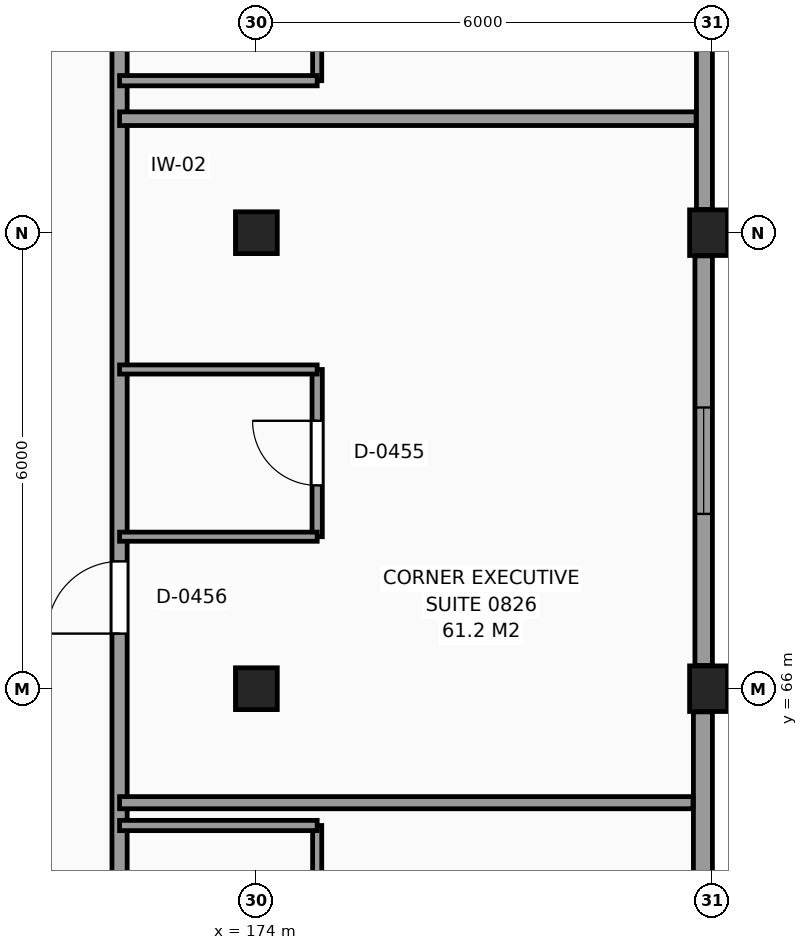
"""IFC4 building model, lengths in metres.
Left out: names, types, materials, properties, quantities, classifications, styles, units other than length and angle.
Written with IfcOpenShell. Run it as: python <this file> out.ifc"""

import sys

from ifc_helpers import new_model, si_unit, direction, frame, frame_2d, origin, origin_2d, place, context, subcontext, project, spatial, rectangle, extrude, element, fill, save


model = new_model("IFC4")
c1 = context("Model", 3, precision=1e-05, world=origin(), true_north=direction((0.0, 1.0)))
c2 = subcontext(c1, "Body", "Model", "MODEL_VIEW")
j1 = project(units=[si_unit("LENGTHUNIT", "METRE"), si_unit("PLANEANGLEUNIT", "RADIAN")], contexts=[c1])
p1 = place(None, origin())
s1 = spatial("IfcSite", under=j1, at=p1, CompositionType="ELEMENT")
p2 = place(p1, origin())
s2 = spatial("IfcBuilding", under=s1, at=p2, CompositionType="ELEMENT")
p3 = place(p2, frame((0.0, 0.0, 34.8)))
s3 = spatial("IfcBuildingStorey", under=s2, at=p3, CompositionType="ELEMENT", Elevation=34.8)
for number, where, z_axis, x_axis in (
    (1, (174.0, 66.0, 0.0), (0.0, 0.0, 1.0), (1.0, 0.0, 0.0)),
    (2, (174.0, 72.0, 0.0), (0.0, 0.0, 1.0), (1.0, 0.0, 0.0)),
):
    element("IfcColumn", number, at=place(p3, frame(where, z_axis=z_axis, x_axis=x_axis)), inside=s3, PredefinedType="COLUMN", context=c2, shape_type="SweptSolid", body=[
        extrude(rectangle(XDim=0.55, YDim=0.55, at=origin_2d()), origin(), (0.0, 0.0, 1.0), 3.3),
    ])
for number, where, z_axis, x_axis in (
    (3, (180.0, 66.0, 0.0), (0.0, 0.0, 1.0), (1.0, 0.0, 0.0)),
    (4, (180.0, 72.0, 0.0), (0.0, 0.0, 1.0), (1.0, 0.0, 0.0)),
):
    element("IfcColumn", number, at=place(p3, frame(where, z_axis=z_axis, x_axis=x_axis)), inside=s3, PredefinedType="COLUMN", context=c2, shape_type="SweptSolid", body=[
        extrude(rectangle(XDim=0.6, YDim=0.6, at=origin_2d()), origin(), (0.0, 0.0, 1.0), 3.3),
    ])
p4 = place(p3, frame((179.875, 60.305, 0.0), z_axis=(0.0, 0.0, 1.0), x_axis=(0.0, 1.0, 0.0)))
e5 = element("IfcWall", 5, at=p4, inside=s3, PredefinedType="SOLIDWALL", context=c2, shape_type="SweptSolid", body=[
    extrude(rectangle(XDim=5.39, YDim=0.25, at=frame_2d((2.695, 0.0))), origin(), (0.0, 0.0, 1.0), 2.42),
])
p5 = place(p4, frame((1.407, 0.0, 0.8)))
e6 = element("IfcOpeningElement", 6, at=p5, cuts=e5, PredefinedType="OPENING", context=c2, shape_type="SweptSolid", body=[
    extrude(rectangle(XDim=1.4, YDim=1.4, at=frame_2d((0.7, 0.7))), frame((0.0, 0.135, 0.0), z_axis=(0.0, -1.0, 0.0), x_axis=(1.0, 0.0, 0.0)), (0.0, 0.0, 1.0), 0.27),
])
p6 = place(p3, frame((179.885, 66.305, 0.0), z_axis=(0.0, 0.0, 1.0), x_axis=(0.0, 1.0, 0.0)))
e7 = element("IfcWall", 7, at=p6, inside=s3, PredefinedType="SOLIDWALL", context=c2, shape_type="SweptSolid", body=[
    extrude(rectangle(XDim=5.39, YDim=0.23, at=frame_2d((2.695, 0.0))), origin(), (0.0, 0.0, 1.0), 2.42),
])
p7 = place(p6, frame((1.995, 0.0, 0.8)))
e8 = element("IfcOpeningElement", 8, at=p7, cuts=e7, PredefinedType="OPENING", context=c2, shape_type="SweptSolid", body=[
    extrude(rectangle(XDim=1.4, YDim=1.4, at=frame_2d((0.7, 0.7))), frame((0.0, 0.125, 0.0), z_axis=(0.0, -1.0, 0.0), x_axis=(1.0, 0.0, 0.0)), (0.0, 0.0, 1.0), 0.25),
])
p8 = place(p3, frame((179.895, 72.305, 0.0), z_axis=(0.0, 0.0, 1.0), x_axis=(0.0, 1.0, 0.0)))
e9 = element("IfcWall", 9, at=p8, inside=s3, PredefinedType="SOLIDWALL", context=c2, shape_type="SweptSolid", body=[
    extrude(rectangle(XDim=5.39, YDim=0.21, at=frame_2d((2.695, 0.0))), origin(), (0.0, 0.0, 1.0), 2.42),
])
p9 = place(p8, frame((2.582, 0.0, 0.8)))
e10 = element("IfcOpeningElement", 10, at=p9, cuts=e9, PredefinedType="OPENING", context=c2, shape_type="SweptSolid", body=[
    extrude(rectangle(XDim=1.4, YDim=1.4, at=frame_2d((0.7, 0.7))), frame((0.0, 0.115, 0.0), z_axis=(0.0, -1.0, 0.0), x_axis=(1.0, 0.0, 0.0)), (0.0, 0.0, 1.0), 0.23),
])
p10 = place(p3, frame((172.2, 42.235, 0.0), z_axis=(0.0, 0.0, 1.0), x_axis=(0.0, 1.0, 0.0)))
e11 = element("IfcWall", 11, at=p10, inside=s3, PredefinedType="PARTITIONING", context=c2, shape_type="SweptSolid", body=[
    extrude(rectangle(XDim=65.585, YDim=0.2, at=frame_2d((32.792, 0.0))), origin(), (0.0, 0.0, 1.0), 3.07),
])
p11 = place(p10, frame((7.59, 0.0, 0.0)))
e12 = element("IfcOpeningElement", 12, at=p11, cuts=e11, PredefinedType="OPENING", context=c2, shape_type="SweptSolid", body=[
    extrude(rectangle(XDim=0.95, YDim=2.1, at=frame_2d((0.475, 1.05))), frame((0.0, 0.11, 0.0), z_axis=(0.0, -1.0, 0.0), x_axis=(1.0, 0.0, 0.0)), (0.0, 0.0, 1.0), 0.22),
])
p12 = place(p10, frame((12.09, 0.0, 0.0)))
e13 = element("IfcOpeningElement", 13, at=p12, cuts=e11, PredefinedType="OPENING", context=c2, shape_type="SweptSolid", body=[
    extrude(rectangle(XDim=0.95, YDim=2.1, at=frame_2d((0.475, 1.05))), frame((0.0, 0.11, 0.0), z_axis=(0.0, -1.0, 0.0), x_axis=(1.0, 0.0, 0.0)), (0.0, 0.0, 1.0), 0.22),
])
p13 = place(p10, frame((16.29, 0.0, 0.0)))
e14 = element("IfcOpeningElement", 14, at=p13, cuts=e11, PredefinedType="OPENING", context=c2, shape_type="SweptSolid", body=[
    extrude(rectangle(XDim=0.95, YDim=2.1, at=frame_2d((0.475, 1.05))), frame((0.0, 0.11, 0.0), z_axis=(0.0, -1.0, 0.0), x_axis=(1.0, 0.0, 0.0)), (0.0, 0.0, 1.0), 0.22),
])
p14 = place(p10, frame((18.49, 0.0, 0.0)))
e15 = element("IfcOpeningElement", 15, at=p14, cuts=e11, PredefinedType="OPENING", context=c2, shape_type="SweptSolid", body=[
    extrude(rectangle(XDim=0.95, YDim=2.1, at=frame_2d((0.475, 1.05))), frame((0.0, 0.11, 0.0), z_axis=(0.0, -1.0, 0.0), x_axis=(1.0, 0.0, 0.0)), (0.0, 0.0, 1.0), 0.22),
])
p15 = place(p10, frame((24.49, 0.0, 0.0)))
e16 = element("IfcOpeningElement", 16, at=p15, cuts=e11, PredefinedType="OPENING", context=c2, shape_type="SweptSolid", body=[
    extrude(rectangle(XDim=0.95, YDim=2.1, at=frame_2d((0.475, 1.05))), frame((0.0, 0.11, 0.0), z_axis=(0.0, -1.0, 0.0), x_axis=(1.0, 0.0, 0.0)), (0.0, 0.0, 1.0), 0.22),
])
p16 = place(p10, frame((34.29, 0.0, 0.0)))
e17 = element("IfcOpeningElement", 17, at=p16, cuts=e11, PredefinedType="OPENING", context=c2, shape_type="SweptSolid", body=[
    extrude(rectangle(XDim=0.95, YDim=2.1, at=frame_2d((0.475, 1.05))), frame((0.0, 0.11, 0.0), z_axis=(0.0, -1.0, 0.0), x_axis=(1.0, 0.0, 0.0)), (0.0, 0.0, 1.0), 0.22),
])
p17 = place(p10, frame((36.49, 0.0, 0.0)))
e18 = element("IfcOpeningElement", 18, at=p17, cuts=e11, PredefinedType="OPENING", context=c2, shape_type="SweptSolid", body=[
    extrude(rectangle(XDim=0.95, YDim=2.1, at=frame_2d((0.475, 1.05))), frame((0.0, 0.11, 0.0), z_axis=(0.0, -1.0, 0.0), x_axis=(1.0, 0.0, 0.0)), (0.0, 0.0, 1.0), 0.22),
])
p18 = place(p10, frame((40.89, 0.0, 0.0)))
e19 = element("IfcOpeningElement", 19, at=p18, cuts=e11, PredefinedType="OPENING", context=c2, shape_type="SweptSolid", body=[
    extrude(rectangle(XDim=0.95, YDim=2.1, at=frame_2d((0.475, 1.05))), frame((0.0, 0.11, 0.0), z_axis=(0.0, -1.0, 0.0), x_axis=(1.0, 0.0, 0.0)), (0.0, 0.0, 1.0), 0.22),
])
p19 = place(p10, frame((45.39, 0.0, 0.0)))
e20 = element("IfcOpeningElement", 20, at=p19, cuts=e11, PredefinedType="OPENING", context=c2, shape_type="SweptSolid", body=[
    extrude(rectangle(XDim=0.95, YDim=2.1, at=frame_2d((0.475, 1.05))), frame((0.0, 0.11, 0.0), z_axis=(0.0, -1.0, 0.0), x_axis=(1.0, 0.0, 0.0)), (0.0, 0.0, 1.0), 0.22),
])
p20 = place(p10, frame((54.49, 0.0, 0.0)))
e21 = element("IfcOpeningElement", 21, at=p20, cuts=e11, PredefinedType="OPENING", context=c2, shape_type="SweptSolid", body=[
    extrude(rectangle(XDim=0.95, YDim=2.1, at=frame_2d((0.475, 1.05))), frame((0.0, 0.11, 0.0), z_axis=(0.0, -1.0, 0.0), x_axis=(1.0, 0.0, 0.0)), (0.0, 0.0, 1.0), 0.22),
])
p21 = place(p10, frame((60.49, 0.0, 0.0)))
e22 = element("IfcOpeningElement", 22, at=p21, cuts=e11, PredefinedType="OPENING", context=c2, shape_type="SweptSolid", body=[
    extrude(rectangle(XDim=0.95, YDim=2.1, at=frame_2d((0.475, 1.05))), frame((0.0, 0.11, 0.0), z_axis=(0.0, -1.0, 0.0), x_axis=(1.0, 0.0, 0.0)), (0.0, 0.0, 1.0), 0.22),
])
p22 = place(p3, frame((174.8, 62.0, 0.0), z_axis=(0.0, 0.0, 1.0), x_axis=(0.0, 1.0, 0.0)))
e23 = element("IfcWall", 23, at=p22, inside=s3, PredefinedType="PARTITIONING", context=c2, shape_type="SweptSolid", body=[
    extrude(rectangle(XDim=2.2, YDim=0.12, at=frame_2d((1.1, 0.0))), origin(), (0.0, 0.0, 1.0), 3.07),
])
p23 = place(p22, frame((0.675, 0.0, 0.0)))
e24 = element("IfcOpeningElement", 24, at=p23, cuts=e23, PredefinedType="OPENING", context=c2, shape_type="SweptSolid", body=[
    extrude(rectangle(XDim=0.85, YDim=2.1, at=frame_2d((0.425, 1.05))), frame((0.0, 0.07, 0.0), z_axis=(0.0, -1.0, 0.0), x_axis=(1.0, 0.0, 0.0)), (0.0, 0.0, 1.0), 0.14),
])
p24 = place(p3, frame((174.8, 68.0, 0.0), z_axis=(0.0, 0.0, 1.0), x_axis=(0.0, 1.0, 0.0)))
e25 = element("IfcWall", 25, at=p24, inside=s3, PredefinedType="PARTITIONING", context=c2, shape_type="SweptSolid", body=[
    extrude(rectangle(XDim=2.2, YDim=0.135, at=frame_2d((1.1, 0.0))), origin(), (0.0, 0.0, 1.0), 3.07),
])
p25 = place(p24, frame((0.675, 0.0, 0.0)))
e26 = element("IfcOpeningElement", 26, at=p25, cuts=e25, PredefinedType="OPENING", context=c2, shape_type="SweptSolid", body=[
    extrude(rectangle(XDim=0.85, YDim=2.1, at=frame_2d((0.425, 1.05))), frame((0.0, 0.078, 0.0), z_axis=(0.0, -1.0, 0.0), x_axis=(1.0, 0.0, 0.0)), (0.0, 0.0, 1.0), 0.155),
])
p26 = place(p3, frame((174.8, 74.0, 0.0), z_axis=(0.0, 0.0, 1.0), x_axis=(0.0, 1.0, 0.0)))
e27 = element("IfcWall", 27, at=p26, inside=s3, PredefinedType="PARTITIONING", context=c2, shape_type="SweptSolid", body=[
    extrude(rectangle(XDim=2.2, YDim=0.12, at=frame_2d((1.1, 0.0))), origin(), (0.0, 0.0, 1.0), 3.07),
])
p27 = place(p26, frame((0.675, 0.0, 0.0)))
e28 = element("IfcOpeningElement", 28, at=p27, cuts=e27, PredefinedType="OPENING", context=c2, shape_type="SweptSolid", body=[
    extrude(rectangle(XDim=0.85, YDim=2.1, at=frame_2d((0.425, 1.05))), frame((0.0, 0.07, 0.0), z_axis=(0.0, -1.0, 0.0), x_axis=(1.0, 0.0, 0.0)), (0.0, 0.0, 1.0), 0.14),
])
p28 = place(p3, frame((172.2, 64.2, 0.0), z_axis=(0.0, 0.0, 1.0), x_axis=(1.0, 0.0, 0.0)))
e29 = element("IfcWall", 29, at=p28, inside=s3, PredefinedType="PARTITIONING", context=c2, shape_type="SweptSolid", body=[
    extrude(rectangle(XDim=2.6, YDim=0.135, at=frame_2d((1.3, 0.0))), origin(), (0.0, 0.0, 1.0), 3.07),
])
p29 = place(p3, frame((172.2, 64.5, 0.0), z_axis=(0.0, 0.0, 1.0), x_axis=(1.0, 0.0, 0.0)))
e30 = element("IfcWall", 30, at=p29, inside=s3, PredefinedType="PARTITIONING", context=c2, shape_type="SweptSolid", body=[
    extrude(rectangle(XDim=7.545, YDim=0.16, at=frame_2d((3.772, 0.0))), origin(), (0.0, 0.0, 1.0), 3.07),
])
for number, where, z_axis, x_axis in (
    (31, (172.2, 68.0, 0.0), (0.0, 0.0, 1.0), (1.0, 0.0, 0.0)),
    (32, (172.2, 70.2, 0.0), (0.0, 0.0, 1.0), (1.0, 0.0, 0.0)),
):
    element("IfcWall", number, at=place(p3, frame(where, z_axis=z_axis, x_axis=x_axis)), inside=s3, PredefinedType="PARTITIONING", context=c2, shape_type="SweptSolid", body=[
        extrude(rectangle(XDim=2.6, YDim=0.12, at=frame_2d((1.3, 0.0))), origin(), (0.0, 0.0, 1.0), 3.07),
    ])
p30 = place(p3, frame((172.2, 73.5, 0.0), z_axis=(0.0, 0.0, 1.0), x_axis=(1.0, 0.0, 0.0)))
e33 = element("IfcWall", 33, at=p30, inside=s3, PredefinedType="PARTITIONING", context=c2, shape_type="SweptSolid", body=[
    extrude(rectangle(XDim=7.585, YDim=0.18, at=frame_2d((3.792, 0.0))), origin(), (0.0, 0.0, 1.0), 3.07),
])
p31 = place(p3, frame((172.2, 74.0, 0.0), z_axis=(0.0, 0.0, 1.0), x_axis=(1.0, 0.0, 0.0)))
e34 = element("IfcWall", 34, at=p31, inside=s3, PredefinedType="PARTITIONING", context=c2, shape_type="SweptSolid", body=[
    extrude(rectangle(XDim=2.6, YDim=0.135, at=frame_2d((1.3, 0.0))), origin(), (0.0, 0.0, 1.0), 3.07),
])
p32 = place(p7, origin())
e35 = element("IfcWindow", 35, at=p32, inside=s3, PartitioningType="SINGLE_PANEL", PredefinedType="WINDOW", context=c2, shape_type="SweptSolid", body=[
    extrude(rectangle(XDim=1.4, YDim=1.4, at=frame_2d((0.7, 0.7))), frame((0.0, 0.03, 0.0), z_axis=(0.0, -1.0, 0.0), x_axis=(1.0, 0.0, 0.0)), (0.0, 0.0, 1.0), 0.06),
])
fill(e8, e35)
p33 = place(p25, origin())
e36 = element("IfcDoor", 36, at=p33, inside=s3, OperationType="SINGLE_SWING_RIGHT", PredefinedType="DOOR", context=c2, shape_type="SweptSolid", body=[
    extrude(rectangle(XDim=0.85, YDim=2.1, at=frame_2d((0.425, 1.05))), frame((0.0, 0.025, 0.0), z_axis=(0.0, -1.0, 0.0), x_axis=(1.0, 0.0, 0.0)), (0.0, 0.0, 1.0), 0.05),
])
fill(e26, e36)
p34 = place(p15, origin())
e37 = element("IfcDoor", 37, at=p34, inside=s3, OperationType="SINGLE_SWING_LEFT", PredefinedType="DOOR", context=c2, shape_type="SweptSolid", body=[
    extrude(rectangle(XDim=0.95, YDim=2.1, at=frame_2d((0.475, 1.05))), frame((0.0, 0.025, 0.0), z_axis=(0.0, -1.0, 0.0), x_axis=(1.0, 0.0, 0.0)), (0.0, 0.0, 1.0), 0.05),
])
fill(e16, e37)
save(model, sys.argv[1])
